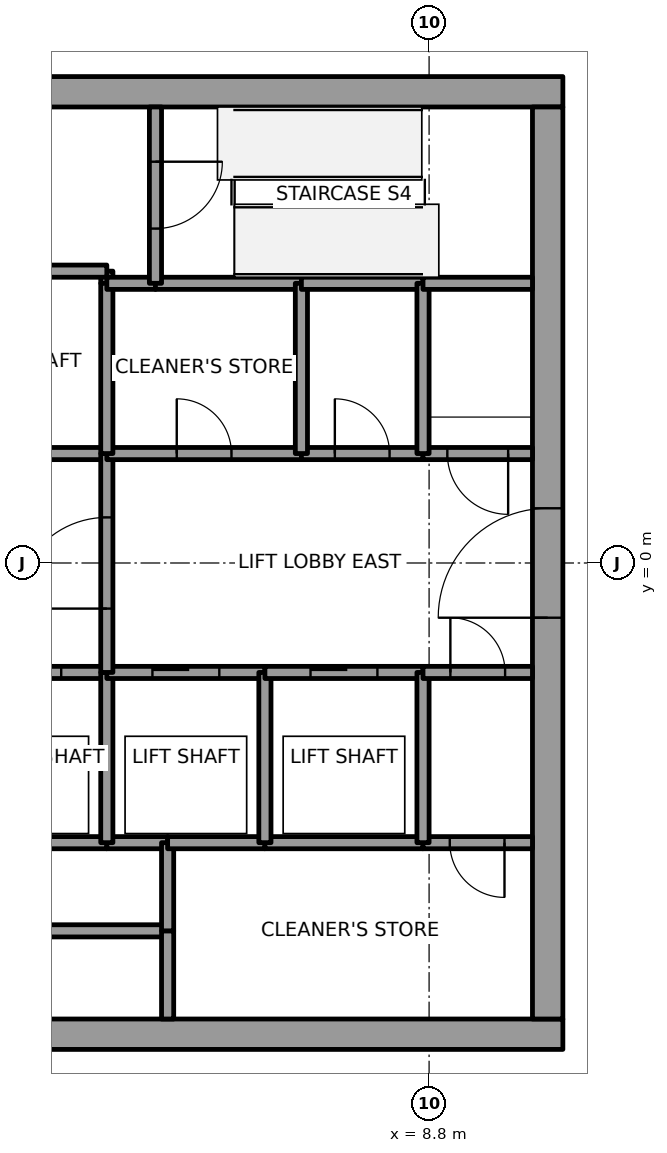
"""IFC4 building model, lengths in metres.
Left out: names, types, materials, properties, quantities, classifications, styles, units other than length and angle.
Written with IfcOpenShell. Run it as: python <this file> out.ifc"""

import sys

from ifc_helpers import new_model, si_unit, direction, frame, frame_2d, origin, place, context, subcontext, project, spatial, rectangle, extrude, element, fill, save


model = new_model("IFC4")
c1 = context("Model", 3, precision=1e-05, world=origin(), true_north=direction((0.0, 1.0)))
c2 = subcontext(c1, "Body", "Model", "MODEL_VIEW")
j1 = project(units=[si_unit("LENGTHUNIT", "METRE"), si_unit("PLANEANGLEUNIT", "RADIAN")], contexts=[c1])
p1 = place(None, origin())
s1 = spatial("IfcSite", under=j1, at=p1, CompositionType="ELEMENT")
p2 = place(p1, origin())
s2 = spatial("IfcBuilding", under=s1, at=p2, CompositionType="ELEMENT")
p3 = place(p2, frame((0.0, 0.0, 259.0)))
s3 = spatial("IfcBuildingStorey", under=s2, at=p3, CompositionType="ELEMENT", Elevation=259.0)
p4 = place(p3, frame((-11.0, -7.75, 0.0), z_axis=(0.0, 0.0, 1.0), x_axis=(1.0, 0.0, 0.0)))
e1 = element("IfcWall", 1, at=p4, inside=s3, PredefinedType="SHEAR", context=c2, shape_type="SweptSolid", body=[
    extrude(rectangle(XDim=22.0, YDim=0.5, at=frame_2d((11.0, 0.0))), origin(), (0.0, 0.0, 1.0), 4.0),
])
p5 = place(p4, frame((10.45, 0.0, 0.0)))
e2 = element("IfcOpeningElement", 2, at=p5, cuts=e1, PredefinedType="OPENING", context=c2, shape_type="SweptSolid", body=[
    extrude(rectangle(XDim=1.1, YDim=2.1, at=frame_2d((0.55, 1.05))), frame((0.0, 0.25, 0.0), z_axis=(0.0, -1.0, 0.0), x_axis=(1.0, 0.0, 0.0)), (0.0, 0.0, 1.0), 0.5),
])
p6 = place(p3, frame((-11.0, 7.75, 0.0), z_axis=(0.0, 0.0, 1.0), x_axis=(1.0, 0.0, 0.0)))
e3 = element("IfcWall", 3, at=p6, inside=s3, PredefinedType="SHEAR", context=c2, shape_type="SweptSolid", body=[
    extrude(rectangle(XDim=22.0, YDim=0.5, at=frame_2d((11.0, 0.0))), origin(), (0.0, 0.0, 1.0), 4.0),
])
p7 = place(p6, frame((10.45, 0.0, 0.0)))
e4 = element("IfcOpeningElement", 4, at=p7, cuts=e3, PredefinedType="OPENING", context=c2, shape_type="SweptSolid", body=[
    extrude(rectangle(XDim=1.1, YDim=2.1, at=frame_2d((0.55, 1.05))), frame((0.0, 0.25, 0.0), z_axis=(0.0, -1.0, 0.0), x_axis=(1.0, 0.0, 0.0)), (0.0, 0.0, 1.0), 0.5),
])
p8 = place(p3, frame((10.75, -7.5, 0.0), z_axis=(0.0, 0.0, 1.0), x_axis=(0.0, 1.0, 0.0)))
e5 = element("IfcWall", 5, at=p8, inside=s3, PredefinedType="SHEAR", context=c2, shape_type="SweptSolid", body=[
    extrude(rectangle(XDim=15.0, YDim=0.5, at=frame_2d((7.5, 0.0))), origin(), (0.0, 0.0, 1.0), 4.0),
])
p9 = place(p8, frame((6.6, 0.0, 0.0)))
e6 = element("IfcOpeningElement", 6, at=p9, cuts=e5, PredefinedType="OPENING", context=c2, shape_type="SweptSolid", body=[
    extrude(rectangle(XDim=1.8, YDim=2.1, at=frame_2d((0.9, 1.05))), frame((0.0, 0.25, 0.0), z_axis=(0.0, -1.0, 0.0), x_axis=(1.0, 0.0, 0.0)), (0.0, 0.0, 1.0), 0.5),
])
p10 = place(p3, frame((4.5, -6.05, 0.0), z_axis=(0.0, 0.0, 1.0), x_axis=(-1.0, 0.0, 0.0)))
e7 = element("IfcWall", 7, at=p10, inside=s3, PredefinedType="SOLIDWALL", context=c2, shape_type="SweptSolid", body=[
    extrude(rectangle(XDim=3.6, YDim=0.2, at=frame_2d((1.8, 0.0))), origin(), (0.0, 0.0, 1.0), 3.85),
])
p11 = place(p3, frame((3.5, -4.6, 0.0), z_axis=(0.0, 0.0, 1.0), x_axis=(-1.0, 0.0, 0.0)))
e8 = element("IfcWall", 8, at=p11, inside=s3, PredefinedType="SOLIDWALL", context=c2, shape_type="SweptSolid", body=[
    extrude(rectangle(XDim=2.6, YDim=0.2, at=frame_2d((1.3, 0.0))), origin(), (0.0, 0.0, 1.0), 3.85),
])
p12 = place(p3, frame((0.9, -1.8, 0.0), z_axis=(0.0, 0.0, 1.0), x_axis=(1.0, 0.0, 0.0)))
e9 = element("IfcWall", 9, at=p12, inside=s3, PredefinedType="SOLIDWALL", context=c2, shape_type="SweptSolid", body=[
    extrude(rectangle(XDim=2.6, YDim=0.2, at=frame_2d((1.3, 0.0))), origin(), (0.0, 0.0, 1.0), 3.85),
])
p13 = place(p12, frame((0.75, 0.0, 0.0)))
e10 = element("IfcOpeningElement", 10, at=p13, cuts=e9, PredefinedType="OPENING", context=c2, shape_type="SweptSolid", body=[
    extrude(rectangle(XDim=1.1, YDim=2.1, at=frame_2d((0.55, 1.05))), frame((0.0, 0.1, 0.0), z_axis=(0.0, -1.0, 0.0), x_axis=(1.0, 0.0, 0.0)), (0.0, 0.0, 1.0), 0.2),
])
p14 = place(p3, frame((3.5, 1.8, 0.0), z_axis=(0.0, 0.0, 1.0), x_axis=(-1.0, 0.0, 0.0)))
e11 = element("IfcWall", 11, at=p14, inside=s3, PredefinedType="SOLIDWALL", context=c2, shape_type="SweptSolid", body=[
    extrude(rectangle(XDim=2.6, YDim=0.2, at=frame_2d((1.3, 0.0))), origin(), (0.0, 0.0, 1.0), 3.85),
])
p15 = place(p3, frame((3.5, 4.6, 0.0), z_axis=(0.0, 0.0, 1.0), x_axis=(0.0, 1.0, 0.0)))
e12 = element("IfcWall", 12, at=p15, inside=s3, PredefinedType="SOLIDWALL", context=c2, shape_type="SweptSolid", body=[
    extrude(rectangle(XDim=0.2, YDim=0.2, at=frame_2d((0.1, 0.0))), origin(), (0.0, 0.0, 1.0), 3.85),
])
p16 = place(p3, frame((3.5, 4.8, 0.0), z_axis=(0.0, 0.0, 1.0), x_axis=(-1.0, 0.0, 0.0)))
e13 = element("IfcWall", 13, at=p16, inside=s3, PredefinedType="SOLIDWALL", context=c2, shape_type="SweptSolid", body=[
    extrude(rectangle(XDim=2.6, YDim=0.2, at=frame_2d((1.3, 0.0))), origin(), (0.0, 0.0, 1.0), 3.85),
])
p17 = place(p3, frame((4.5, -4.6, 0.0), z_axis=(0.0, 0.0, 1.0), x_axis=(-1.0, 0.0, 0.0)))
e14 = element("IfcWall", 14, at=p17, inside=s3, PredefinedType="SOLIDWALL", context=c2, shape_type="SweptSolid", body=[
    extrude(rectangle(XDim=1.0, YDim=0.2, at=frame_2d((0.5, 0.0))), origin(), (0.0, 0.0, 1.0), 3.85),
])
p18 = place(p3, frame((3.5, -4.6, 0.0), z_axis=(0.0, 0.0, 1.0), x_axis=(0.0, 1.0, 0.0)))
e15 = element("IfcWall", 15, at=p18, inside=s3, PredefinedType="SOLIDWALL", context=c2, shape_type="SweptSolid", body=[
    extrude(rectangle(XDim=2.8, YDim=0.2, at=frame_2d((1.4, 0.0))), origin(), (0.0, 0.0, 1.0), 3.85),
])
p19 = place(p3, frame((3.5, -1.8, 0.0), z_axis=(0.0, 0.0, 1.0), x_axis=(1.0, 0.0, 0.0)))
e16 = element("IfcWall", 16, at=p19, inside=s3, PredefinedType="SOLIDWALL", context=c2, shape_type="SweptSolid", body=[
    extrude(rectangle(XDim=2.6, YDim=0.2, at=frame_2d((1.3, 0.0))), origin(), (0.0, 0.0, 1.0), 3.85),
])
p20 = place(p19, frame((0.75, 0.0, 0.0)))
e17 = element("IfcOpeningElement", 17, at=p20, cuts=e16, PredefinedType="OPENING", context=c2, shape_type="SweptSolid", body=[
    extrude(rectangle(XDim=1.1, YDim=2.1, at=frame_2d((0.55, 1.05))), frame((0.0, 0.1, 0.0), z_axis=(0.0, -1.0, 0.0), x_axis=(1.0, 0.0, 0.0)), (0.0, 0.0, 1.0), 0.2),
])
p21 = place(p3, frame((3.5, -1.8, 0.0), z_axis=(0.0, 0.0, 1.0), x_axis=(0.0, 1.0, 0.0)))
e18 = element("IfcWall", 18, at=p21, inside=s3, PredefinedType="SOLIDWALL", context=c2, shape_type="SweptSolid", body=[
    extrude(rectangle(XDim=3.6, YDim=0.2, at=frame_2d((1.8, 0.0))), origin(), (0.0, 0.0, 1.0), 3.85),
])
p22 = place(p21, frame((1.05, 0.0, 0.0)))
e19 = element("IfcOpeningElement", 19, at=p22, cuts=e18, PredefinedType="OPENING", context=c2, shape_type="SweptSolid", body=[
    extrude(rectangle(XDim=1.5, YDim=2.1, at=frame_2d((0.75, 1.05))), frame((0.0, 0.1, 0.0), z_axis=(0.0, -1.0, 0.0), x_axis=(1.0, 0.0, 0.0)), (0.0, 0.0, 1.0), 0.2),
])
p23 = place(p3, frame((3.5, 1.8, 0.0), z_axis=(0.0, 0.0, 1.0), x_axis=(1.0, 0.0, 0.0)))
e20 = element("IfcWall", 20, at=p23, inside=s3, PredefinedType="SOLIDWALL", context=c2, shape_type="SweptSolid", body=[
    extrude(rectangle(XDim=3.2, YDim=0.2, at=frame_2d((1.6, 0.0))), origin(), (0.0, 0.0, 1.0), 3.85),
])
p24 = place(p23, frame((1.15, 0.0, 0.0)))
e21 = element("IfcOpeningElement", 21, at=p24, cuts=e20, PredefinedType="OPENING", context=c2, shape_type="SweptSolid", body=[
    extrude(rectangle(XDim=0.9, YDim=2.1, at=frame_2d((0.45, 1.05))), frame((0.0, 0.1, 0.0), z_axis=(0.0, -1.0, 0.0), x_axis=(1.0, 0.0, 0.0)), (0.0, 0.0, 1.0), 0.2),
])
p25 = place(p3, frame((3.5, 4.6, 0.0), z_axis=(0.0, 0.0, 1.0), x_axis=(0.0, -1.0, 0.0)))
e22 = element("IfcWall", 22, at=p25, inside=s3, PredefinedType="SOLIDWALL", context=c2, shape_type="SweptSolid", body=[
    extrude(rectangle(XDim=2.8, YDim=0.2, at=frame_2d((1.4, 0.0))), origin(), (0.0, 0.0, 1.0), 3.85),
])
p26 = place(p3, frame((4.3, 4.6, 0.0), z_axis=(0.0, 0.0, 1.0), x_axis=(-1.0, 0.0, 0.0)))
e23 = element("IfcWall", 23, at=p26, inside=s3, PredefinedType="SOLIDWALL", context=c2, shape_type="SweptSolid", body=[
    extrude(rectangle(XDim=0.8, YDim=0.2, at=frame_2d((0.4, 0.0))), origin(), (0.0, 0.0, 1.0), 3.85),
])
p27 = place(p3, frame((6.7, 4.6, 0.0), z_axis=(0.0, 0.0, 1.0), x_axis=(-1.0, 0.0, 0.0)))
e24 = element("IfcWall", 24, at=p27, inside=s3, PredefinedType="SOLIDWALL", context=c2, shape_type="SweptSolid", body=[
    extrude(rectangle(XDim=2.4, YDim=0.2, at=frame_2d((1.2, 0.0))), origin(), (0.0, 0.0, 1.0), 3.85),
])
p28 = place(p3, frame((4.3, 7.5, 0.0), z_axis=(0.0, 0.0, 1.0), x_axis=(0.0, -1.0, 0.0)))
e25 = element("IfcWall", 25, at=p28, inside=s3, PredefinedType="SOLIDWALL", context=c2, shape_type="SweptSolid", body=[
    extrude(rectangle(XDim=2.9, YDim=0.2, at=frame_2d((1.45, 0.0))), origin(), (0.0, 0.0, 1.0), 3.85),
])
p29 = place(p28, frame((0.9, 0.0, 0.0)))
e26 = element("IfcOpeningElement", 26, at=p29, cuts=e25, PredefinedType="OPENING", context=c2, shape_type="SweptSolid", body=[
    extrude(rectangle(XDim=1.1, YDim=2.1, at=frame_2d((0.55, 1.05))), frame((0.0, 0.1, 0.0), z_axis=(0.0, -1.0, 0.0), x_axis=(1.0, 0.0, 0.0)), (0.0, 0.0, 1.0), 0.2),
])
for number, where, z_axis, x_axis in (
    (27, (4.5, -6.05, 0.0), (0.0, 0.0, 1.0), (0.0, -1.0, 0.0)),
    (28, (4.5, -4.6, 0.0), (0.0, 0.0, 1.0), (0.0, -1.0, 0.0)),
):
    element("IfcWall", number, at=place(p3, frame(where, z_axis=z_axis, x_axis=x_axis)), inside=s3, PredefinedType="SOLIDWALL", context=c2, shape_type="SweptSolid", body=[
        extrude(rectangle(XDim=1.45, YDim=0.2, at=frame_2d((0.725, 0.0))), origin(), (0.0, 0.0, 1.0), 3.85),
    ])
p30 = place(p3, frame((6.1, -4.6, 0.0), z_axis=(0.0, 0.0, 1.0), x_axis=(-1.0, 0.0, 0.0)))
e29 = element("IfcWall", 29, at=p30, inside=s3, PredefinedType="SOLIDWALL", context=c2, shape_type="SweptSolid", body=[
    extrude(rectangle(XDim=1.6, YDim=0.2, at=frame_2d((0.8, 0.0))), origin(), (0.0, 0.0, 1.0), 3.85),
])
p31 = place(p3, frame((8.7, -4.6, 0.0), z_axis=(0.0, 0.0, 1.0), x_axis=(-1.0, 0.0, 0.0)))
e30 = element("IfcWall", 30, at=p31, inside=s3, PredefinedType="SOLIDWALL", context=c2, shape_type="SweptSolid", body=[
    extrude(rectangle(XDim=2.6, YDim=0.2, at=frame_2d((1.3, 0.0))), origin(), (0.0, 0.0, 1.0), 3.85),
])
p32 = place(p3, frame((6.1, -4.6, 0.0), z_axis=(0.0, 0.0, 1.0), x_axis=(0.0, 1.0, 0.0)))
e31 = element("IfcWall", 31, at=p32, inside=s3, PredefinedType="SOLIDWALL", context=c2, shape_type="SweptSolid", body=[
    extrude(rectangle(XDim=2.8, YDim=0.2, at=frame_2d((1.4, 0.0))), origin(), (0.0, 0.0, 1.0), 3.85),
])
p33 = place(p3, frame((6.1, -1.8, 0.0), z_axis=(0.0, 0.0, 1.0), x_axis=(1.0, 0.0, 0.0)))
e32 = element("IfcWall", 32, at=p33, inside=s3, PredefinedType="SOLIDWALL", context=c2, shape_type="SweptSolid", body=[
    extrude(rectangle(XDim=2.6, YDim=0.2, at=frame_2d((1.3, 0.0))), origin(), (0.0, 0.0, 1.0), 3.85),
])
p34 = place(p33, frame((0.75, 0.0, 0.0)))
e33 = element("IfcOpeningElement", 33, at=p34, cuts=e32, PredefinedType="OPENING", context=c2, shape_type="SweptSolid", body=[
    extrude(rectangle(XDim=1.1, YDim=2.1, at=frame_2d((0.55, 1.05))), frame((0.0, 0.1, 0.0), z_axis=(0.0, -1.0, 0.0), x_axis=(1.0, 0.0, 0.0)), (0.0, 0.0, 1.0), 0.2),
])
p35 = place(p3, frame((6.7, 1.8, 0.0), z_axis=(0.0, 0.0, 1.0), x_axis=(1.0, 0.0, 0.0)))
e34 = element("IfcWall", 34, at=p35, inside=s3, PredefinedType="SOLIDWALL", context=c2, shape_type="SweptSolid", body=[
    extrude(rectangle(XDim=2.0, YDim=0.2, at=frame_2d((1.0, 0.0))), origin(), (0.0, 0.0, 1.0), 3.85),
])
p36 = place(p35, frame((0.55, 0.0, 0.0)))
e35 = element("IfcOpeningElement", 35, at=p36, cuts=e34, PredefinedType="OPENING", context=c2, shape_type="SweptSolid", body=[
    extrude(rectangle(XDim=0.9, YDim=2.1, at=frame_2d((0.45, 1.05))), frame((0.0, 0.1, 0.0), z_axis=(0.0, -1.0, 0.0), x_axis=(1.0, 0.0, 0.0)), (0.0, 0.0, 1.0), 0.2),
])
p37 = place(p3, frame((6.7, 1.8, 0.0), z_axis=(0.0, 0.0, 1.0), x_axis=(0.0, 1.0, 0.0)))
e36 = element("IfcWall", 36, at=p37, inside=s3, PredefinedType="SOLIDWALL", context=c2, shape_type="SweptSolid", body=[
    extrude(rectangle(XDim=2.8, YDim=0.2, at=frame_2d((1.4, 0.0))), origin(), (0.0, 0.0, 1.0), 3.85),
])
p38 = place(p3, frame((8.7, 4.6, 0.0), z_axis=(0.0, 0.0, 1.0), x_axis=(-1.0, 0.0, 0.0)))
e37 = element("IfcWall", 37, at=p38, inside=s3, PredefinedType="SOLIDWALL", context=c2, shape_type="SweptSolid", body=[
    extrude(rectangle(XDim=2.0, YDim=0.2, at=frame_2d((1.0, 0.0))), origin(), (0.0, 0.0, 1.0), 3.85),
])
p39 = place(p3, frame((10.5, -4.6, 0.0), z_axis=(0.0, 0.0, 1.0), x_axis=(-1.0, 0.0, 0.0)))
e38 = element("IfcWall", 38, at=p39, inside=s3, PredefinedType="SOLIDWALL", context=c2, shape_type="SweptSolid", body=[
    extrude(rectangle(XDim=1.8, YDim=0.2, at=frame_2d((0.9, 0.0))), origin(), (0.0, 0.0, 1.0), 3.85),
])
p40 = place(p39, frame((0.46, 0.0, 0.0)))
e39 = element("IfcOpeningElement", 39, at=p40, cuts=e38, PredefinedType="OPENING", context=c2, shape_type="SweptSolid", body=[
    extrude(rectangle(XDim=0.9, YDim=2.1, at=frame_2d((0.45, 1.05))), frame((0.0, 0.1, 0.0), z_axis=(0.0, -1.0, 0.0), x_axis=(1.0, 0.0, 0.0)), (0.0, 0.0, 1.0), 0.2),
])
p41 = place(p3, frame((8.7, -1.8, 0.0), z_axis=(0.0, 0.0, 1.0), x_axis=(0.0, -1.0, 0.0)))
e40 = element("IfcWall", 40, at=p41, inside=s3, PredefinedType="SOLIDWALL", context=c2, shape_type="SweptSolid", body=[
    extrude(rectangle(XDim=2.8, YDim=0.2, at=frame_2d((1.4, 0.0))), origin(), (0.0, 0.0, 1.0), 3.85),
])
p42 = place(p3, frame((8.7, -1.8, 0.0), z_axis=(0.0, 0.0, 1.0), x_axis=(1.0, 0.0, 0.0)))
e41 = element("IfcWall", 41, at=p42, inside=s3, PredefinedType="SOLIDWALL", context=c2, shape_type="SweptSolid", body=[
    extrude(rectangle(XDim=1.8, YDim=0.2, at=frame_2d((0.9, 0.0))), origin(), (0.0, 0.0, 1.0), 3.85),
])
p43 = place(p42, frame((0.45, 0.0, 0.0)))
e42 = element("IfcOpeningElement", 42, at=p43, cuts=e41, PredefinedType="OPENING", context=c2, shape_type="SweptSolid", body=[
    extrude(rectangle(XDim=0.9, YDim=2.1, at=frame_2d((0.45, 1.05))), frame((0.0, 0.1, 0.0), z_axis=(0.0, -1.0, 0.0), x_axis=(1.0, 0.0, 0.0)), (0.0, 0.0, 1.0), 0.2),
])
p44 = place(p3, frame((10.5, 1.8, 0.0), z_axis=(0.0, 0.0, 1.0), x_axis=(-1.0, 0.0, 0.0)))
e43 = element("IfcWall", 43, at=p44, inside=s3, PredefinedType="SOLIDWALL", context=c2, shape_type="SweptSolid", body=[
    extrude(rectangle(XDim=1.8, YDim=0.2, at=frame_2d((0.9, 0.0))), origin(), (0.0, 0.0, 1.0), 3.85),
])
p45 = place(p44, frame((0.4, 0.0, 0.0)))
e44 = element("IfcOpeningElement", 44, at=p45, cuts=e43, PredefinedType="OPENING", context=c2, shape_type="SweptSolid", body=[
    extrude(rectangle(XDim=1.0, YDim=2.1, at=frame_2d((0.5, 1.05))), frame((0.0, 0.1, 0.0), z_axis=(0.0, -1.0, 0.0), x_axis=(1.0, 0.0, 0.0)), (0.0, 0.0, 1.0), 0.2),
])
p46 = place(p3, frame((8.7, 1.8, 0.0), z_axis=(0.0, 0.0, 1.0), x_axis=(0.0, 1.0, 0.0)))
e45 = element("IfcWall", 45, at=p46, inside=s3, PredefinedType="SOLIDWALL", context=c2, shape_type="SweptSolid", body=[
    extrude(rectangle(XDim=2.8, YDim=0.2, at=frame_2d((1.4, 0.0))), origin(), (0.0, 0.0, 1.0), 3.85),
])
p47 = place(p3, frame((10.5, 4.6, 0.0), z_axis=(0.0, 0.0, 1.0), x_axis=(-1.0, 0.0, 0.0)))
e46 = element("IfcWall", 46, at=p47, inside=s3, PredefinedType="SOLIDWALL", context=c2, shape_type="SweptSolid", body=[
    extrude(rectangle(XDim=1.8, YDim=0.2, at=frame_2d((0.9, 0.0))), origin(), (0.0, 0.0, 1.0), 3.85),
])
p48 = place(p13, origin())
e47 = element("IfcDoor", 47, at=p48, inside=s3, OperationType="SLIDING_TO_RIGHT", PredefinedType="DOOR", context=c2, shape_type="SweptSolid", body=[
    extrude(rectangle(XDim=1.1, YDim=2.1, at=frame_2d((0.55, 1.05))), frame((0.0, 0.025, 0.0), z_axis=(0.0, -1.0, 0.0), x_axis=(1.0, 0.0, 0.0)), (0.0, 0.0, 1.0), 0.05),
])
fill(e10, e47)
p49 = place(p20, origin())
e48 = element("IfcDoor", 48, at=p49, inside=s3, OperationType="SLIDING_TO_LEFT", PredefinedType="DOOR", context=c2, shape_type="SweptSolid", body=[
    extrude(rectangle(XDim=1.1, YDim=2.1, at=frame_2d((0.55, 1.05))), frame((0.0, 0.025, 0.0), z_axis=(0.0, -1.0, 0.0), x_axis=(1.0, 0.0, 0.0)), (0.0, 0.0, 1.0), 0.05),
])
fill(e17, e48)
p50 = place(p34, origin())
e49 = element("IfcDoor", 49, at=p50, inside=s3, OperationType="SLIDING_TO_LEFT", PredefinedType="DOOR", context=c2, shape_type="SweptSolid", body=[
    extrude(rectangle(XDim=1.1, YDim=2.1, at=frame_2d((0.55, 1.05))), frame((0.0, 0.025, 0.0), z_axis=(0.0, -1.0, 0.0), x_axis=(1.0, 0.0, 0.0)), (0.0, 0.0, 1.0), 0.05),
])
fill(e33, e49)
p51 = place(p22, origin())
e50 = element("IfcDoor", 50, at=p51, inside=s3, OperationType="DOUBLE_DOOR_SINGLE_SWING", PredefinedType="DOOR", context=c2, shape_type="SweptSolid", body=[
    extrude(rectangle(XDim=1.5, YDim=2.1, at=frame_2d((0.75, 1.05))), frame((0.0, 0.025, 0.0), z_axis=(0.0, -1.0, 0.0), x_axis=(1.0, 0.0, 0.0)), (0.0, 0.0, 1.0), 0.05),
])
fill(e19, e50)
p52 = place(p45, origin())
e51 = element("IfcDoor", 51, at=p52, inside=s3, OperationType="SINGLE_SWING_LEFT", PredefinedType="DOOR", context=c2, shape_type="SweptSolid", body=[
    extrude(rectangle(XDim=1.0, YDim=2.1, at=frame_2d((0.5, 1.05))), frame((0.0, 0.025, 0.0), z_axis=(0.0, -1.0, 0.0), x_axis=(1.0, 0.0, 0.0)), (0.0, 0.0, 1.0), 0.05),
])
fill(e44, e51)
p53 = place(p29, origin())
e52 = element("IfcDoor", 52, at=p53, inside=s3, OperationType="SINGLE_SWING_RIGHT", PredefinedType="DOOR", context=c2, shape_type="SweptSolid", body=[
    extrude(rectangle(XDim=1.1, YDim=2.1, at=frame_2d((0.55, 1.05))), frame((0.0, 0.025, 0.0), z_axis=(0.0, -1.0, 0.0), x_axis=(1.0, 0.0, 0.0)), (0.0, 0.0, 1.0), 0.05),
])
fill(e26, e52)
p54 = place(p24, origin())
e53 = element("IfcDoor", 53, at=p54, inside=s3, OperationType="SINGLE_SWING_RIGHT", PredefinedType="DOOR", context=c2, shape_type="SweptSolid", body=[
    extrude(rectangle(XDim=0.9, YDim=2.1, at=frame_2d((0.45, 1.05))), frame((0.0, 0.025, 0.0), z_axis=(0.0, -1.0, 0.0), x_axis=(1.0, 0.0, 0.0)), (0.0, 0.0, 1.0), 0.05),
])
fill(e21, e53)
p55 = place(p36, origin())
e54 = element("IfcDoor", 54, at=p55, inside=s3, OperationType="SINGLE_SWING_LEFT", PredefinedType="DOOR", context=c2, shape_type="SweptSolid", body=[
    extrude(rectangle(XDim=0.9, YDim=2.1, at=frame_2d((0.45, 1.05))), frame((0.0, 0.025, 0.0), z_axis=(0.0, -1.0, 0.0), x_axis=(1.0, 0.0, 0.0)), (0.0, 0.0, 1.0), 0.05),
])
fill(e35, e54)
p56 = place(p40, origin())
e55 = element("IfcDoor", 55, at=p56, inside=s3, OperationType="SINGLE_SWING_RIGHT", PredefinedType="DOOR", context=c2, shape_type="SweptSolid", body=[
    extrude(rectangle(XDim=0.9, YDim=2.1, at=frame_2d((0.45, 1.05))), frame((0.0, 0.025, 0.0), z_axis=(0.0, -1.0, 0.0), x_axis=(1.0, 0.0, 0.0)), (0.0, 0.0, 1.0), 0.05),
])
fill(e39, e55)
p57 = place(p43, origin())
e56 = element("IfcDoor", 56, at=p57, inside=s3, OperationType="SINGLE_SWING_LEFT", PredefinedType="DOOR", context=c2, shape_type="SweptSolid", body=[
    extrude(rectangle(XDim=0.9, YDim=2.1, at=frame_2d((0.45, 1.05))), frame((0.0, 0.025, 0.0), z_axis=(0.0, -1.0, 0.0), x_axis=(1.0, 0.0, 0.0)), (0.0, 0.0, 1.0), 0.05),
])
fill(e42, e56)
p58 = place(p9, origin())
e57 = element("IfcDoor", 57, at=p58, inside=s3, OperationType="DOUBLE_DOOR_SINGLE_SWING", PredefinedType="DOOR", context=c2, shape_type="SweptSolid", body=[
    extrude(rectangle(XDim=1.8, YDim=2.1, at=frame_2d((0.9, 1.05))), frame((0.0, 0.025, 0.0), z_axis=(0.0, -1.0, 0.0), x_axis=(1.0, 0.0, 0.0)), (0.0, 0.0, 1.0), 0.05),
])
fill(e6, e57)
save(model, sys.argv[1])
